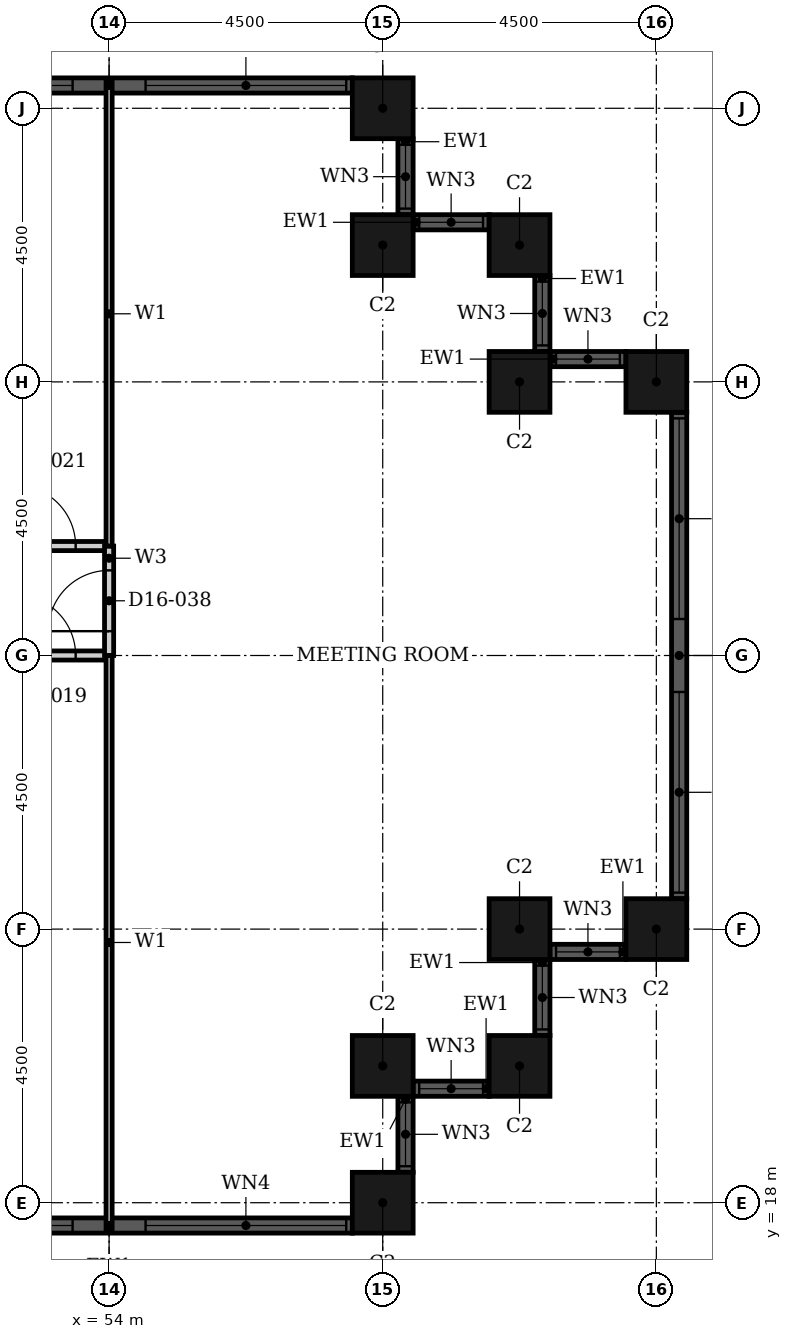
"""IFC4 building model, lengths in metres.
Left out: names, types, materials, properties, quantities, classifications, styles, units other than length and angle.
Written with IfcOpenShell. Run it as: python <this file> out.ifc"""

import sys

from ifc_helpers import new_model, si_unit, direction, frame, frame_2d, origin, origin_2d, place, context, subcontext, project, spatial, rectangle, hollow_rectangle, extrude, element, fill, save


model = new_model("IFC4")
c1 = context("Model", 3, precision=1e-05, world=origin(), true_north=direction((0.0, 1.0)))
c2 = subcontext(c1, "Body", "Model", "MODEL_VIEW")
j1 = project(units=[si_unit("LENGTHUNIT", "METRE"), si_unit("PLANEANGLEUNIT", "RADIAN")], contexts=[c1])
p1 = place(None, origin())
s1 = spatial("IfcSite", under=j1, at=p1, CompositionType="ELEMENT")
p2 = place(p1, origin())
s2 = spatial("IfcBuilding", under=s1, at=p2, CompositionType="ELEMENT")
p3 = place(p2, frame((0.0, 0.0, 70.8)))
s3 = spatial("IfcBuildingStorey", under=s2, at=p3, CompositionType="ELEMENT", Elevation=70.8)
for number, where, z_axis, x_axis in (
    (1, (58.5, 18.0, 0.0), (0.0, 0.0, 1.0), (1.0, 0.0, 0.0)),
    (2, (58.5, 20.25, 0.0), (0.0, 0.0, 1.0), (1.0, 0.0, 0.0)),
    (3, (60.75, 20.25, 0.0), (0.0, 0.0, 1.0), (1.0, 0.0, 0.0)),
    (4, (60.75, 22.5, 0.0), (0.0, 0.0, 1.0), (1.0, 0.0, 0.0)),
    (5, (63.0, 22.5, 0.0), (0.0, 0.0, 1.0), (1.0, 0.0, 0.0)),
    (6, (63.0, 31.5, 0.0), (0.0, 0.0, 1.0), (1.0, 0.0, 0.0)),
    (7, (60.75, 31.5, 0.0), (0.0, 0.0, 1.0), (1.0, 0.0, 0.0)),
    (8, (60.75, 33.75, 0.0), (0.0, 0.0, 1.0), (1.0, 0.0, 0.0)),
    (9, (58.5, 33.75, 0.0), (0.0, 0.0, 1.0), (1.0, 0.0, 0.0)),
    (10, (58.5, 36.0, 0.0), (0.0, 0.0, 1.0), (1.0, 0.0, 0.0)),
):
    element("IfcColumn", number, at=place(p3, frame(where, z_axis=z_axis, x_axis=x_axis)), inside=s3, PredefinedType="COLUMN", context=c2, shape_type="SweptSolid", body=[
        extrude(hollow_rectangle(XDim=1.0, YDim=1.0, WallThickness=0.032, at=origin_2d()), origin(), (0.0, 0.0, 1.0), 3.6),
    ])
p4 = place(p3, frame((50.0, 17.625, 0.0), z_axis=(0.0, 0.0, 1.0), x_axis=(1.0, 0.0, 0.0)))
e11 = element("IfcWall", 11, at=p4, inside=s3, PredefinedType="SOLIDWALL", context=c2, shape_type="SweptSolid", body=[
    extrude(rectangle(XDim=8.0, YDim=0.25, at=frame_2d((4.0, 0.0))), origin(), (0.0, 0.0, 1.0), 3.6),
])
p5 = place(p4, frame((0.1, 0.0, 0.9)))
e12 = element("IfcOpeningElement", 12, at=p5, cuts=e11, PredefinedType="OPENING", context=c2, shape_type="SweptSolid", body=[
    extrude(rectangle(XDim=3.3, YDim=2.08, at=frame_2d((1.65, 1.04))), frame((0.0, 0.135, 0.0), z_axis=(0.0, -1.0, 0.0), x_axis=(1.0, 0.0, 0.0)), (0.0, 0.0, 1.0), 0.27),
])
p6 = place(p4, frame((4.6, 0.0, 0.9)))
e13 = element("IfcOpeningElement", 13, at=p6, cuts=e11, PredefinedType="OPENING", context=c2, shape_type="SweptSolid", body=[
    extrude(rectangle(XDim=3.3, YDim=2.08, at=frame_2d((1.65, 1.04))), frame((0.0, 0.135, 0.0), z_axis=(0.0, -1.0, 0.0), x_axis=(1.0, 0.0, 0.0)), (0.0, 0.0, 1.0), 0.27),
])
p7 = place(p3, frame((58.875, 18.5, 0.0), z_axis=(0.0, 0.0, 1.0), x_axis=(0.0, 1.0, 0.0)))
e14 = element("IfcWall", 14, at=p7, inside=s3, PredefinedType="SOLIDWALL", context=c2, shape_type="SweptSolid", body=[
    extrude(rectangle(XDim=1.25, YDim=0.25, at=frame_2d((0.625, 0.0))), origin(), (0.0, 0.0, 1.0), 3.6),
])
p8 = place(p7, frame((0.1, 0.0, 0.9)))
e15 = element("IfcOpeningElement", 15, at=p8, cuts=e14, PredefinedType="OPENING", context=c2, shape_type="SweptSolid", body=[
    extrude(rectangle(XDim=1.05, YDim=2.08, at=frame_2d((0.525, 1.04))), frame((0.0, 0.135, 0.0), z_axis=(0.0, -1.0, 0.0), x_axis=(1.0, 0.0, 0.0)), (0.0, 0.0, 1.0), 0.27),
])
p9 = place(p3, frame((59.0, 19.875, 0.0), z_axis=(0.0, 0.0, 1.0), x_axis=(1.0, 0.0, 0.0)))
e16 = element("IfcWall", 16, at=p9, inside=s3, PredefinedType="SOLIDWALL", context=c2, shape_type="SweptSolid", body=[
    extrude(rectangle(XDim=1.25, YDim=0.25, at=frame_2d((0.625, 0.0))), origin(), (0.0, 0.0, 1.0), 3.6),
])
p10 = place(p9, frame((0.1, 0.0, 0.9)))
e17 = element("IfcOpeningElement", 17, at=p10, cuts=e16, PredefinedType="OPENING", context=c2, shape_type="SweptSolid", body=[
    extrude(rectangle(XDim=1.05, YDim=2.08, at=frame_2d((0.525, 1.04))), frame((0.0, 0.135, 0.0), z_axis=(0.0, -1.0, 0.0), x_axis=(1.0, 0.0, 0.0)), (0.0, 0.0, 1.0), 0.27),
])
p11 = place(p3, frame((61.125, 20.75, 0.0), z_axis=(0.0, 0.0, 1.0), x_axis=(0.0, 1.0, 0.0)))
e18 = element("IfcWall", 18, at=p11, inside=s3, PredefinedType="SOLIDWALL", context=c2, shape_type="SweptSolid", body=[
    extrude(rectangle(XDim=1.25, YDim=0.25, at=frame_2d((0.625, 0.0))), origin(), (0.0, 0.0, 1.0), 3.6),
])
p12 = place(p11, frame((0.1, 0.0, 0.9)))
e19 = element("IfcOpeningElement", 19, at=p12, cuts=e18, PredefinedType="OPENING", context=c2, shape_type="SweptSolid", body=[
    extrude(rectangle(XDim=1.05, YDim=2.08, at=frame_2d((0.525, 1.04))), frame((0.0, 0.135, 0.0), z_axis=(0.0, -1.0, 0.0), x_axis=(1.0, 0.0, 0.0)), (0.0, 0.0, 1.0), 0.27),
])
p13 = place(p3, frame((61.25, 22.125, 0.0), z_axis=(0.0, 0.0, 1.0), x_axis=(1.0, 0.0, 0.0)))
e20 = element("IfcWall", 20, at=p13, inside=s3, PredefinedType="SOLIDWALL", context=c2, shape_type="SweptSolid", body=[
    extrude(rectangle(XDim=1.25, YDim=0.25, at=frame_2d((0.625, 0.0))), origin(), (0.0, 0.0, 1.0), 3.6),
])
p14 = place(p13, frame((0.1, 0.0, 0.9)))
e21 = element("IfcOpeningElement", 21, at=p14, cuts=e20, PredefinedType="OPENING", context=c2, shape_type="SweptSolid", body=[
    extrude(rectangle(XDim=1.05, YDim=2.08, at=frame_2d((0.525, 1.04))), frame((0.0, 0.135, 0.0), z_axis=(0.0, -1.0, 0.0), x_axis=(1.0, 0.0, 0.0)), (0.0, 0.0, 1.0), 0.27),
])
p15 = place(p3, frame((63.375, 23.0, 0.0), z_axis=(0.0, 0.0, 1.0), x_axis=(0.0, 1.0, 0.0)))
e22 = element("IfcWall", 22, at=p15, inside=s3, PredefinedType="SOLIDWALL", context=c2, shape_type="SweptSolid", body=[
    extrude(rectangle(XDim=8.0, YDim=0.25, at=frame_2d((4.0, 0.0))), origin(), (0.0, 0.0, 1.0), 3.6),
])
p16 = place(p15, frame((0.1, 0.0, 0.9)))
e23 = element("IfcOpeningElement", 23, at=p16, cuts=e22, PredefinedType="OPENING", context=c2, shape_type="SweptSolid", body=[
    extrude(rectangle(XDim=3.3, YDim=2.08, at=frame_2d((1.65, 1.04))), frame((0.0, 0.135, 0.0), z_axis=(0.0, -1.0, 0.0), x_axis=(1.0, 0.0, 0.0)), (0.0, 0.0, 1.0), 0.27),
])
p17 = place(p15, frame((4.6, 0.0, 0.9)))
e24 = element("IfcOpeningElement", 24, at=p17, cuts=e22, PredefinedType="OPENING", context=c2, shape_type="SweptSolid", body=[
    extrude(rectangle(XDim=3.3, YDim=2.08, at=frame_2d((1.65, 1.04))), frame((0.0, 0.135, 0.0), z_axis=(0.0, -1.0, 0.0), x_axis=(1.0, 0.0, 0.0)), (0.0, 0.0, 1.0), 0.27),
])
p18 = place(p3, frame((62.5, 31.875, 0.0), z_axis=(0.0, 0.0, 1.0), x_axis=(-1.0, 0.0, 0.0)))
e25 = element("IfcWall", 25, at=p18, inside=s3, PredefinedType="SOLIDWALL", context=c2, shape_type="SweptSolid", body=[
    extrude(rectangle(XDim=1.25, YDim=0.25, at=frame_2d((0.625, 0.0))), origin(), (0.0, 0.0, 1.0), 3.6),
])
p19 = place(p18, frame((0.1, 0.0, 0.9)))
e26 = element("IfcOpeningElement", 26, at=p19, cuts=e25, PredefinedType="OPENING", context=c2, shape_type="SweptSolid", body=[
    extrude(rectangle(XDim=1.05, YDim=2.08, at=frame_2d((0.525, 1.04))), frame((0.0, 0.135, 0.0), z_axis=(0.0, -1.0, 0.0), x_axis=(1.0, 0.0, 0.0)), (0.0, 0.0, 1.0), 0.27),
])
p20 = place(p3, frame((61.125, 32.0, 0.0), z_axis=(0.0, 0.0, 1.0), x_axis=(0.0, 1.0, 0.0)))
e27 = element("IfcWall", 27, at=p20, inside=s3, PredefinedType="SOLIDWALL", context=c2, shape_type="SweptSolid", body=[
    extrude(rectangle(XDim=1.25, YDim=0.25, at=frame_2d((0.625, 0.0))), origin(), (0.0, 0.0, 1.0), 3.6),
])
p21 = place(p20, frame((0.1, 0.0, 0.9)))
e28 = element("IfcOpeningElement", 28, at=p21, cuts=e27, PredefinedType="OPENING", context=c2, shape_type="SweptSolid", body=[
    extrude(rectangle(XDim=1.05, YDim=2.08, at=frame_2d((0.525, 1.04))), frame((0.0, 0.135, 0.0), z_axis=(0.0, -1.0, 0.0), x_axis=(1.0, 0.0, 0.0)), (0.0, 0.0, 1.0), 0.27),
])
p22 = place(p3, frame((60.25, 34.125, 0.0), z_axis=(0.0, 0.0, 1.0), x_axis=(-1.0, 0.0, 0.0)))
e29 = element("IfcWall", 29, at=p22, inside=s3, PredefinedType="SOLIDWALL", context=c2, shape_type="SweptSolid", body=[
    extrude(rectangle(XDim=1.25, YDim=0.25, at=frame_2d((0.625, 0.0))), origin(), (0.0, 0.0, 1.0), 3.6),
])
p23 = place(p22, frame((0.1, 0.0, 0.9)))
e30 = element("IfcOpeningElement", 30, at=p23, cuts=e29, PredefinedType="OPENING", context=c2, shape_type="SweptSolid", body=[
    extrude(rectangle(XDim=1.05, YDim=2.08, at=frame_2d((0.525, 1.04))), frame((0.0, 0.135, 0.0), z_axis=(0.0, -1.0, 0.0), x_axis=(1.0, 0.0, 0.0)), (0.0, 0.0, 1.0), 0.27),
])
p24 = place(p3, frame((58.875, 34.25, 0.0), z_axis=(0.0, 0.0, 1.0), x_axis=(0.0, 1.0, 0.0)))
e31 = element("IfcWall", 31, at=p24, inside=s3, PredefinedType="SOLIDWALL", context=c2, shape_type="SweptSolid", body=[
    extrude(rectangle(XDim=1.25, YDim=0.25, at=frame_2d((0.625, 0.0))), origin(), (0.0, 0.0, 1.0), 3.6),
])
p25 = place(p24, frame((0.1, 0.0, 0.9)))
e32 = element("IfcOpeningElement", 32, at=p25, cuts=e31, PredefinedType="OPENING", context=c2, shape_type="SweptSolid", body=[
    extrude(rectangle(XDim=1.05, YDim=2.08, at=frame_2d((0.525, 1.04))), frame((0.0, 0.135, 0.0), z_axis=(0.0, -1.0, 0.0), x_axis=(1.0, 0.0, 0.0)), (0.0, 0.0, 1.0), 0.27),
])
p26 = place(p3, frame((58.0, 36.375, 0.0), z_axis=(0.0, 0.0, 1.0), x_axis=(-1.0, 0.0, 0.0)))
e33 = element("IfcWall", 33, at=p26, inside=s3, PredefinedType="SOLIDWALL", context=c2, shape_type="SweptSolid", body=[
    extrude(rectangle(XDim=8.0, YDim=0.25, at=frame_2d((4.0, 0.0))), origin(), (0.0, 0.0, 1.0), 3.6),
])
p27 = place(p26, frame((0.1, 0.0, 0.9)))
e34 = element("IfcOpeningElement", 34, at=p27, cuts=e33, PredefinedType="OPENING", context=c2, shape_type="SweptSolid", body=[
    extrude(rectangle(XDim=3.3, YDim=2.08, at=frame_2d((1.65, 1.04))), frame((0.0, 0.135, 0.0), z_axis=(0.0, -1.0, 0.0), x_axis=(1.0, 0.0, 0.0)), (0.0, 0.0, 1.0), 0.27),
])
p28 = place(p26, frame((4.6, 0.0, 0.9)))
e35 = element("IfcOpeningElement", 35, at=p28, cuts=e33, PredefinedType="OPENING", context=c2, shape_type="SweptSolid", body=[
    extrude(rectangle(XDim=3.3, YDim=2.08, at=frame_2d((1.65, 1.04))), frame((0.0, 0.135, 0.0), z_axis=(0.0, -1.0, 0.0), x_axis=(1.0, 0.0, 0.0)), (0.0, 0.0, 1.0), 0.27),
])
p29 = place(p3, frame((46.8, 27.0, 0.0), z_axis=(0.0, 0.0, 1.0), x_axis=(1.0, 0.0, 0.0)))
e36 = element("IfcWall", 36, at=p29, inside=s3, PredefinedType="PARTITIONING", context=c2, shape_type="SweptSolid", body=[
    extrude(rectangle(XDim=7.2, YDim=0.15, at=frame_2d((3.6, 0.0))), origin(), (0.0, 0.0, 1.0), 2.58),
])
p30 = place(p29, frame((5.65, 0.0, 0.0)))
e37 = element("IfcOpeningElement", 37, at=p30, cuts=e36, PredefinedType="OPENING", context=c2, shape_type="SweptSolid", body=[
    extrude(rectangle(XDim=1.0, YDim=2.1, at=frame_2d((0.5, 1.05))), frame((0.0, 0.085, 0.0), z_axis=(0.0, -1.0, 0.0), x_axis=(1.0, 0.0, 0.0)), (0.0, 0.0, 1.0), 0.17),
])
p31 = place(p3, frame((46.8, 28.8, 0.0), z_axis=(0.0, 0.0, 1.0), x_axis=(1.0, 0.0, 0.0)))
e38 = element("IfcWall", 38, at=p31, inside=s3, PredefinedType="PARTITIONING", context=c2, shape_type="SweptSolid", body=[
    extrude(rectangle(XDim=7.2, YDim=0.15, at=frame_2d((3.6, 0.0))), origin(), (0.0, 0.0, 1.0), 3.3),
])
p32 = place(p31, frame((5.65, 0.0, 0.0)))
e39 = element("IfcOpeningElement", 39, at=p32, cuts=e38, PredefinedType="OPENING", context=c2, shape_type="SweptSolid", body=[
    extrude(rectangle(XDim=1.0, YDim=2.1, at=frame_2d((0.5, 1.05))), frame((0.0, 0.085, 0.0), z_axis=(0.0, -1.0, 0.0), x_axis=(1.0, 0.0, 0.0)), (0.0, 0.0, 1.0), 0.17),
])
p33 = place(p3, frame((54.0, 27.0, 0.0), z_axis=(0.0, 0.0, 1.0), x_axis=(0.0, 1.0, 0.0)))
e40 = element("IfcWall", 40, at=p33, inside=s3, PredefinedType="PARTITIONING", context=c2, shape_type="SweptSolid", body=[
    extrude(rectangle(XDim=1.8, YDim=0.15, at=frame_2d((0.9, 0.0))), origin(), (0.0, 0.0, 1.0), 3.3),
])
p34 = place(p33, frame((0.4, 0.0, 0.0)))
e41 = element("IfcOpeningElement", 41, at=p34, cuts=e40, PredefinedType="OPENING", context=c2, shape_type="SweptSolid", body=[
    extrude(rectangle(XDim=1.0, YDim=2.1, at=frame_2d((0.5, 1.05))), frame((0.0, 0.085, 0.0), z_axis=(0.0, -1.0, 0.0), x_axis=(1.0, 0.0, 0.0)), (0.0, 0.0, 1.0), 0.17),
])
p35 = place(p3, frame((54.0, 28.8, 0.0), z_axis=(0.0, 0.0, 1.0), x_axis=(0.0, 1.0, 0.0)))
e42 = element("IfcWall", 42, at=p35, inside=s3, PredefinedType="PARTITIONING", context=c2, shape_type="SweptSolid", body=[
    extrude(rectangle(XDim=7.64, YDim=0.1, at=frame_2d((3.82, 0.0))), origin(), (0.0, 0.0, 1.0), 3.3),
])
p36 = place(p3, frame((54.0, 17.56, 0.0), z_axis=(0.0, 0.0, 1.0), x_axis=(0.0, 1.0, 0.0)))
e43 = element("IfcWall", 43, at=p36, inside=s3, PredefinedType="PARTITIONING", context=c2, shape_type="SweptSolid", body=[
    extrude(rectangle(XDim=9.44, YDim=0.1, at=frame_2d((4.72, 0.0))), origin(), (0.0, 0.0, 1.0), 3.3),
])
p37 = place(p5, origin())
e44 = element("IfcWindow", 44, at=p37, inside=s3, PartitioningType="SINGLE_PANEL", PredefinedType="WINDOW", context=c2, shape_type="SweptSolid", body=[
    extrude(rectangle(XDim=3.3, YDim=2.08, at=frame_2d((1.65, 1.04))), frame((0.0, 0.03, 0.0), z_axis=(0.0, -1.0, 0.0), x_axis=(1.0, 0.0, 0.0)), (0.0, 0.0, 1.0), 0.06),
])
fill(e12, e44)
p38 = place(p6, origin())
e45 = element("IfcWindow", 45, at=p38, inside=s3, PartitioningType="SINGLE_PANEL", PredefinedType="WINDOW", context=c2, shape_type="SweptSolid", body=[
    extrude(rectangle(XDim=3.3, YDim=2.08, at=frame_2d((1.65, 1.04))), frame((0.0, 0.03, 0.0), z_axis=(0.0, -1.0, 0.0), x_axis=(1.0, 0.0, 0.0)), (0.0, 0.0, 1.0), 0.06),
])
fill(e13, e45)
p39 = place(p8, origin())
e46 = element("IfcWindow", 46, at=p39, inside=s3, PartitioningType="SINGLE_PANEL", PredefinedType="WINDOW", context=c2, shape_type="SweptSolid", body=[
    extrude(rectangle(XDim=1.05, YDim=2.08, at=frame_2d((0.525, 1.04))), frame((0.0, 0.03, 0.0), z_axis=(0.0, -1.0, 0.0), x_axis=(1.0, 0.0, 0.0)), (0.0, 0.0, 1.0), 0.06),
])
fill(e15, e46)
p40 = place(p10, origin())
e47 = element("IfcWindow", 47, at=p40, inside=s3, PartitioningType="SINGLE_PANEL", PredefinedType="WINDOW", context=c2, shape_type="SweptSolid", body=[
    extrude(rectangle(XDim=1.05, YDim=2.08, at=frame_2d((0.525, 1.04))), frame((0.0, 0.03, 0.0), z_axis=(0.0, -1.0, 0.0), x_axis=(1.0, 0.0, 0.0)), (0.0, 0.0, 1.0), 0.06),
])
fill(e17, e47)
p41 = place(p12, origin())
e48 = element("IfcWindow", 48, at=p41, inside=s3, PartitioningType="SINGLE_PANEL", PredefinedType="WINDOW", context=c2, shape_type="SweptSolid", body=[
    extrude(rectangle(XDim=1.05, YDim=2.08, at=frame_2d((0.525, 1.04))), frame((0.0, 0.03, 0.0), z_axis=(0.0, -1.0, 0.0), x_axis=(1.0, 0.0, 0.0)), (0.0, 0.0, 1.0), 0.06),
])
fill(e19, e48)
p42 = place(p14, origin())
e49 = element("IfcWindow", 49, at=p42, inside=s3, PartitioningType="SINGLE_PANEL", PredefinedType="WINDOW", context=c2, shape_type="SweptSolid", body=[
    extrude(rectangle(XDim=1.05, YDim=2.08, at=frame_2d((0.525, 1.04))), frame((0.0, 0.03, 0.0), z_axis=(0.0, -1.0, 0.0), x_axis=(1.0, 0.0, 0.0)), (0.0, 0.0, 1.0), 0.06),
])
fill(e21, e49)
p43 = place(p16, origin())
e50 = element("IfcWindow", 50, at=p43, inside=s3, PartitioningType="SINGLE_PANEL", PredefinedType="WINDOW", context=c2, shape_type="SweptSolid", body=[
    extrude(rectangle(XDim=3.3, YDim=2.08, at=frame_2d((1.65, 1.04))), frame((0.0, 0.03, 0.0), z_axis=(0.0, -1.0, 0.0), x_axis=(1.0, 0.0, 0.0)), (0.0, 0.0, 1.0), 0.06),
])
fill(e23, e50)
p44 = place(p17, origin())
e51 = element("IfcWindow", 51, at=p44, inside=s3, PartitioningType="SINGLE_PANEL", PredefinedType="WINDOW", context=c2, shape_type="SweptSolid", body=[
    extrude(rectangle(XDim=3.3, YDim=2.08, at=frame_2d((1.65, 1.04))), frame((0.0, 0.03, 0.0), z_axis=(0.0, -1.0, 0.0), x_axis=(1.0, 0.0, 0.0)), (0.0, 0.0, 1.0), 0.06),
])
fill(e24, e51)
p45 = place(p19, origin())
e52 = element("IfcWindow", 52, at=p45, inside=s3, PartitioningType="SINGLE_PANEL", PredefinedType="WINDOW", context=c2, shape_type="SweptSolid", body=[
    extrude(rectangle(XDim=1.05, YDim=2.08, at=frame_2d((0.525, 1.04))), frame((0.0, 0.03, 0.0), z_axis=(0.0, -1.0, 0.0), x_axis=(1.0, 0.0, 0.0)), (0.0, 0.0, 1.0), 0.06),
])
fill(e26, e52)
p46 = place(p21, origin())
e53 = element("IfcWindow", 53, at=p46, inside=s3, PartitioningType="SINGLE_PANEL", PredefinedType="WINDOW", context=c2, shape_type="SweptSolid", body=[
    extrude(rectangle(XDim=1.05, YDim=2.08, at=frame_2d((0.525, 1.04))), frame((0.0, 0.03, 0.0), z_axis=(0.0, -1.0, 0.0), x_axis=(1.0, 0.0, 0.0)), (0.0, 0.0, 1.0), 0.06),
])
fill(e28, e53)
p47 = place(p23, origin())
e54 = element("IfcWindow", 54, at=p47, inside=s3, PartitioningType="SINGLE_PANEL", PredefinedType="WINDOW", context=c2, shape_type="SweptSolid", body=[
    extrude(rectangle(XDim=1.05, YDim=2.08, at=frame_2d((0.525, 1.04))), frame((0.0, 0.03, 0.0), z_axis=(0.0, -1.0, 0.0), x_axis=(1.0, 0.0, 0.0)), (0.0, 0.0, 1.0), 0.06),
])
fill(e30, e54)
p48 = place(p25, origin())
e55 = element("IfcWindow", 55, at=p48, inside=s3, PartitioningType="SINGLE_PANEL", PredefinedType="WINDOW", context=c2, shape_type="SweptSolid", body=[
    extrude(rectangle(XDim=1.05, YDim=2.08, at=frame_2d((0.525, 1.04))), frame((0.0, 0.03, 0.0), z_axis=(0.0, -1.0, 0.0), x_axis=(1.0, 0.0, 0.0)), (0.0, 0.0, 1.0), 0.06),
])
fill(e32, e55)
p49 = place(p27, origin())
e56 = element("IfcWindow", 56, at=p49, inside=s3, PartitioningType="SINGLE_PANEL", PredefinedType="WINDOW", context=c2, shape_type="SweptSolid", body=[
    extrude(rectangle(XDim=3.3, YDim=2.08, at=frame_2d((1.65, 1.04))), frame((0.0, 0.03, 0.0), z_axis=(0.0, -1.0, 0.0), x_axis=(1.0, 0.0, 0.0)), (0.0, 0.0, 1.0), 0.06),
])
fill(e34, e56)
p50 = place(p28, origin())
e57 = element("IfcWindow", 57, at=p50, inside=s3, PartitioningType="SINGLE_PANEL", PredefinedType="WINDOW", context=c2, shape_type="SweptSolid", body=[
    extrude(rectangle(XDim=3.3, YDim=2.08, at=frame_2d((1.65, 1.04))), frame((0.0, 0.03, 0.0), z_axis=(0.0, -1.0, 0.0), x_axis=(1.0, 0.0, 0.0)), (0.0, 0.0, 1.0), 0.06),
])
fill(e35, e57)
p51 = place(p30, origin())
e58 = element("IfcDoor", 58, at=p51, inside=s3, OperationType="SINGLE_SWING_RIGHT", PredefinedType="DOOR", context=c2, shape_type="SweptSolid", body=[
    extrude(rectangle(XDim=1.0, YDim=2.1, at=frame_2d((0.5, 1.05))), frame((0.0, 0.025, 0.0), z_axis=(0.0, -1.0, 0.0), x_axis=(1.0, 0.0, 0.0)), (0.0, 0.0, 1.0), 0.05),
])
fill(e37, e58)
p52 = place(p32, origin())
e59 = element("IfcDoor", 59, at=p52, inside=s3, OperationType="SINGLE_SWING_RIGHT", PredefinedType="DOOR", context=c2, shape_type="SweptSolid", body=[
    extrude(rectangle(XDim=1.0, YDim=2.1, at=frame_2d((0.5, 1.05))), frame((0.0, 0.025, 0.0), z_axis=(0.0, -1.0, 0.0), x_axis=(1.0, 0.0, 0.0)), (0.0, 0.0, 1.0), 0.05),
])
fill(e39, e59)
p53 = place(p34, origin())
e60 = element("IfcDoor", 60, at=p53, inside=s3, OperationType="SINGLE_SWING_LEFT", PredefinedType="DOOR", context=c2, shape_type="SweptSolid", body=[
    extrude(rectangle(XDim=1.0, YDim=2.1, at=frame_2d((0.5, 1.05))), frame((0.0, 0.025, 0.0), z_axis=(0.0, -1.0, 0.0), x_axis=(1.0, 0.0, 0.0)), (0.0, 0.0, 1.0), 0.05),
])
fill(e41, e60)
save(model, sys.argv[1])
